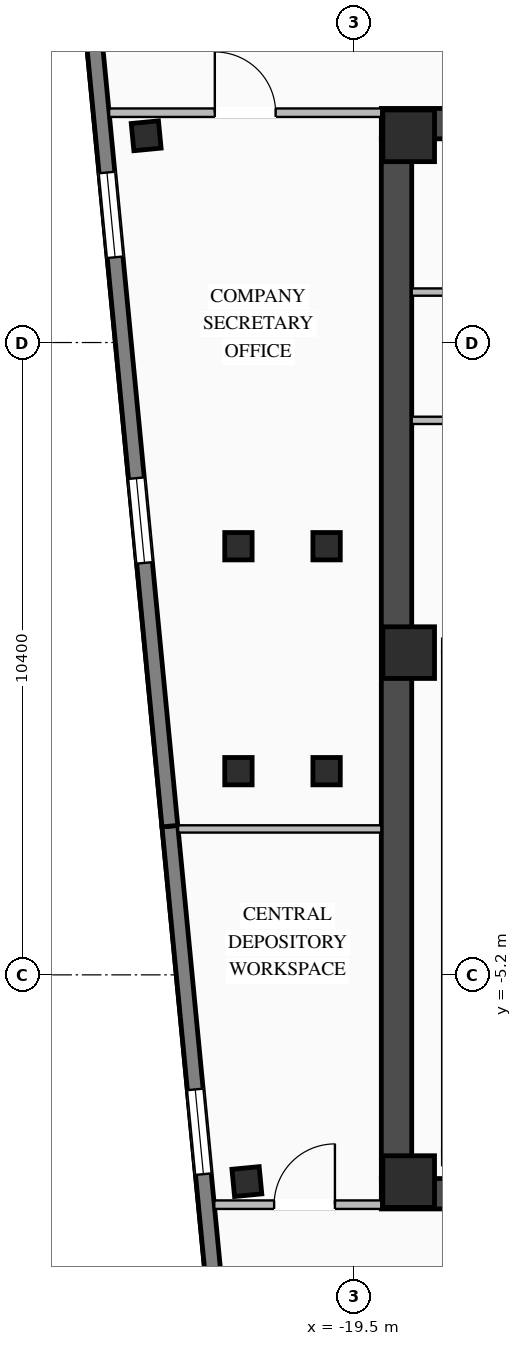
"""IFC4 building model, lengths in metres.
Left out: names, types, materials, properties, quantities, classifications, styles, units other than length and angle.
Written with IfcOpenShell. Run it as: python <this file> out.ifc"""

import sys

from ifc_helpers import new_model, si_unit, direction, frame, frame_2d, origin, origin_2d, place, context, subcontext, project, spatial, rectangle, i_section, extrude, element, fill, save


model = new_model("IFC4")
c1 = context("Model", 3, precision=1e-05, world=origin(), true_north=direction((0.0, 1.0)))
c2 = subcontext(c1, "Body", "Model", "MODEL_VIEW")
j1 = project(units=[si_unit("LENGTHUNIT", "METRE"), si_unit("PLANEANGLEUNIT", "RADIAN")], contexts=[c1])
p1 = place(None, origin())
s1 = spatial("IfcSite", under=j1, at=p1, CompositionType="ELEMENT")
p2 = place(p1, origin())
s2 = spatial("IfcBuilding", under=s1, at=p2, CompositionType="ELEMENT")
p3 = place(p2, frame((0.0, 0.0, 262.05)))
s3 = spatial("IfcBuildingStorey", under=s2, at=p3, CompositionType="ELEMENT", Elevation=262.05)
p4 = place(p3, frame((-19.05, -8.8, 0.0), z_axis=(0.0, 0.0, 1.0), x_axis=(1.0, 0.0, 0.0)))
e1 = element("IfcWall", 1, at=p4, inside=s3, PredefinedType="SHEAR", context=c2, shape_type="SweptSolid", body=[
    extrude(rectangle(XDim=10.25, YDim=0.5, at=frame_2d((5.125, 0.0))), origin(), (0.0, 0.0, 1.0), 3.27),
])
p5 = place(p3, frame((-19.05, 8.8, 0.0), z_axis=(0.0, 0.0, 1.0), x_axis=(1.0, 0.0, 0.0)))
e2 = element("IfcWall", 2, at=p5, inside=s3, PredefinedType="SHEAR", context=c2, shape_type="SweptSolid", body=[
    extrude(rectangle(XDim=10.25, YDim=0.5, at=frame_2d((5.125, 0.0))), origin(), (0.0, 0.0, 1.0), 3.27),
])
p6 = place(p5, frame((5.6, 0.0, 0.0)))
e3 = element("IfcOpeningElement", 3, at=p6, cuts=e2, PredefinedType="OPENING", context=c2, shape_type="SweptSolid", body=[
    extrude(rectangle(XDim=1.4, YDim=2.05, at=frame_2d((0.7, 1.025))), frame((0.0, 0.26, 0.0), z_axis=(0.0, -1.0, 0.0), x_axis=(1.0, 0.0, 0.0)), (0.0, 0.0, 1.0), 0.52),
])
p7 = place(p3, frame((-18.8, -8.55, 0.0), z_axis=(0.0, 0.0, 1.0), x_axis=(0.0, 1.0, 0.0)))
e4 = element("IfcWall", 4, at=p7, inside=s3, PredefinedType="SHEAR", context=c2, shape_type="SweptSolid", body=[
    extrude(rectangle(XDim=17.1, YDim=0.5, at=frame_2d((8.55, 0.0))), origin(), (0.0, 0.0, 1.0), 3.27),
])
for number, where, z_axis, x_axis in (
    (5, (-18.6, -8.6, 0.0), (0.0, 0.0, 1.0), (1.0, 0.0, 0.0)),
    (6, (-18.6, 0.1, 0.0), (0.0, 0.0, 1.0), (1.0, 0.0, 0.0)),
    (7, (-18.6, 8.6, 0.0), (0.0, 0.0, 1.0), (1.0, 0.0, 0.0)),
):
    element("IfcColumn", number, at=place(p3, frame(where, z_axis=z_axis, x_axis=x_axis)), inside=s3, PredefinedType="COLUMN", context=c2, shape_type="SweptSolid", body=[
        extrude(rectangle(XDim=0.85, YDim=0.85, at=origin_2d()), origin(), (0.0, 0.0, 1.0), 3.45),
    ])
for number, where, z_axis, x_axis in (
    (8, (-21.4, -1.85, 0.0), (0.0, 0.0, 1.0), (1.0, 0.0, 0.0)),
    (9, (-21.4, 1.85, 0.0), (0.0, 0.0, 1.0), (1.0, 0.0, 0.0)),
    (10, (-19.95, -1.85, 0.0), (0.0, 0.0, 1.0), (1.0, 0.0, 0.0)),
    (11, (-19.95, 1.85, 0.0), (0.0, 0.0, 1.0), (1.0, 0.0, 0.0)),
    (12, (-21.261, -8.6, 0.0), (0.0, 0.0, 1.0), (0.995, 0.096, 0.0)),
    (13, (-22.917, 8.6, 0.0), (0.0, 0.0, 1.0), (0.995, 0.096, 0.0)),
):
    element("IfcColumn", number, at=place(p3, frame(where, z_axis=z_axis, x_axis=x_axis)), inside=s3, PredefinedType="COLUMN", context=c2, shape_type="SweptSolid", body=[
        extrude(i_section(OverallWidth=0.45, OverallDepth=0.45, WebThickness=0.022, FlangeThickness=0.032, at=origin_2d()), origin(), (0.0, 0.0, 1.0), 3.45),
    ])
p8 = place(p3, frame((-21.075, -17.834, 0.0), z_axis=(0.0, 0.0, 1.0), x_axis=(-0.095852427869, 0.995395555582, 0.0)))
e14 = element("IfcWall", 14, at=p8, inside=s3, PredefinedType="STANDARD", context=c2, shape_type="SweptSolid", body=[
    extrude(rectangle(XDim=15.15, YDim=0.26, at=frame_2d((7.575, 0.0))), origin(), (0.0, 0.0, 1.0), 2.645),
])
p9 = place(p8, frame((4.35, 0.0, 0.535)))
e15 = element("IfcOpeningElement", 15, at=p9, cuts=e14, PredefinedType="OPENING", context=c2, shape_type="SweptSolid", body=[
    extrude(rectangle(XDim=1.4, YDim=1.95, at=frame_2d((0.7, 0.975))), frame((0.0, 0.14, 0.0), z_axis=(0.0, -1.0, 0.0), x_axis=(1.0, 0.0, 0.0)), (0.0, 0.0, 1.0), 0.28),
])
p10 = place(p8, frame((9.4, 0.0, 0.535)))
e16 = element("IfcOpeningElement", 16, at=p10, cuts=e14, PredefinedType="OPENING", context=c2, shape_type="SweptSolid", body=[
    extrude(rectangle(XDim=1.4, YDim=1.95, at=frame_2d((0.7, 0.975))), frame((0.0, 0.14, 0.0), z_axis=(0.0, -1.0, 0.0), x_axis=(1.0, 0.0, 0.0)), (0.0, 0.0, 1.0), 0.28),
])
p11 = place(p3, frame((-22.527, -2.754, 0.0), z_axis=(0.0, 0.0, 1.0), x_axis=(-0.095850890337, 0.995395703638, 0.0)))
e17 = element("IfcWall", 17, at=p11, inside=s3, PredefinedType="STANDARD", context=c2, shape_type="SweptSolid", body=[
    extrude(rectangle(XDim=15.15, YDim=0.26, at=frame_2d((7.575, 0.0))), origin(), (0.0, 0.0, 1.0), 3.25),
])
p12 = place(p11, frame((4.35, 0.0, 0.76)))
e18 = element("IfcOpeningElement", 18, at=p12, cuts=e17, PredefinedType="OPENING", context=c2, shape_type="SweptSolid", body=[
    extrude(rectangle(XDim=1.4, YDim=1.95, at=frame_2d((0.7, 0.975))), frame((0.0, 0.14, 0.0), z_axis=(0.0, -1.0, 0.0), x_axis=(1.0, 0.0, 0.0)), (0.0, 0.0, 1.0), 0.28),
])
p13 = place(p11, frame((9.4, 0.0, 0.76)))
e19 = element("IfcOpeningElement", 19, at=p13, cuts=e17, PredefinedType="OPENING", context=c2, shape_type="SweptSolid", body=[
    extrude(rectangle(XDim=1.4, YDim=1.95, at=frame_2d((0.7, 0.975))), frame((0.0, 0.14, 0.0), z_axis=(0.0, -1.0, 0.0), x_axis=(1.0, 0.0, 0.0)), (0.0, 0.0, 1.0), 0.28),
])
p14 = place(p3, frame((-18.55, 3.92, 0.0), z_axis=(0.0, 0.0, 1.0), x_axis=(1.0, 0.0, 0.0)))
e20 = element("IfcWall", 20, at=p14, inside=s3, PredefinedType="STANDARD", context=c2, shape_type="SweptSolid", body=[
    extrude(rectangle(XDim=4.65, YDim=0.12, at=frame_2d((2.325, 0.0))), origin(), (0.0, 0.0, 1.0), 3.25),
])
p15 = place(p3, frame((-18.55, 6.03, 0.0), z_axis=(0.0, 0.0, 1.0), x_axis=(1.0, 0.0, 0.0)))
e21 = element("IfcWall", 21, at=p15, inside=s3, PredefinedType="STANDARD", context=c2, shape_type="SweptSolid", body=[
    extrude(rectangle(XDim=2.4, YDim=0.12, at=frame_2d((1.2, 0.0))), origin(), (0.0, 0.0, 1.0), 3.25),
])
p16 = place(p3, frame((-23.527, 8.98, 0.0), z_axis=(0.0, 0.0, 1.0), x_axis=(1.0, 0.0, 0.0)))
e22 = element("IfcWall", 22, at=p16, inside=s3, PredefinedType="STANDARD", context=c2, shape_type="SweptSolid", body=[
    extrude(rectangle(XDim=4.477, YDim=0.14, at=frame_2d((2.238, 0.0))), origin(), (0.0, 0.0, 1.0), 3.25),
])
p17 = place(p16, frame((1.738, 0.0, 0.0)))
e23 = element("IfcOpeningElement", 23, at=p17, cuts=e22, PredefinedType="OPENING", context=c2, shape_type="SweptSolid", body=[
    extrude(rectangle(XDim=1.0, YDim=2.08, at=frame_2d((0.5, 1.04))), frame((0.0, 0.08, 0.0), z_axis=(0.0, -1.0, 0.0), x_axis=(1.0, 0.0, 0.0)), (0.0, 0.0, 1.0), 0.16),
])
p18 = place(p3, frame((-21.797, -8.98, 0.0), z_axis=(0.0, 0.0, 1.0), x_axis=(1.0, 0.0, 0.0)))
e24 = element("IfcWall", 24, at=p18, inside=s3, PredefinedType="STANDARD", context=c2, shape_type="SweptSolid", body=[
    extrude(rectangle(XDim=2.747, YDim=0.14, at=frame_2d((1.374, 0.0))), origin(), (0.0, 0.0, 1.0), 3.25),
])
p19 = place(p18, frame((0.984, 0.0, 0.0)))
e25 = element("IfcOpeningElement", 25, at=p19, cuts=e24, PredefinedType="OPENING", context=c2, shape_type="SweptSolid", body=[
    extrude(rectangle(XDim=1.0, YDim=2.08, at=frame_2d((0.5, 1.04))), frame((0.0, 0.08, 0.0), z_axis=(0.0, -1.0, 0.0), x_axis=(1.0, 0.0, 0.0)), (0.0, 0.0, 1.0), 0.16),
])
p20 = place(p3, frame((-22.392, -2.8, 0.0), z_axis=(0.0, 0.0, 1.0), x_axis=(1.0, 0.0, 0.0)))
e26 = element("IfcWall", 26, at=p20, inside=s3, PredefinedType="STANDARD", context=c2, shape_type="SweptSolid", body=[
    extrude(rectangle(XDim=3.342, YDim=0.12, at=frame_2d((1.671, 0.0))), origin(), (0.0, 0.0, 1.0), 3.25),
])
p21 = place(p10, origin())
e27 = element("IfcWindow", 27, at=p21, inside=s3, PartitioningType="SINGLE_PANEL", PredefinedType="WINDOW", context=c2, shape_type="SweptSolid", body=[
    extrude(rectangle(XDim=1.4, YDim=1.95, at=frame_2d((0.7, 0.975))), frame((0.0, 0.03, 0.0), z_axis=(0.0, -1.0, 0.0), x_axis=(1.0, 0.0, 0.0)), (0.0, 0.0, 1.0), 0.06),
])
fill(e16, e27)
p22 = place(p12, origin())
e28 = element("IfcWindow", 28, at=p22, inside=s3, PartitioningType="SINGLE_PANEL", PredefinedType="WINDOW", context=c2, shape_type="SweptSolid", body=[
    extrude(rectangle(XDim=1.4, YDim=1.95, at=frame_2d((0.7, 0.975))), frame((0.0, 0.03, 0.0), z_axis=(0.0, -1.0, 0.0), x_axis=(1.0, 0.0, 0.0)), (0.0, 0.0, 1.0), 0.06),
])
fill(e18, e28)
p23 = place(p13, origin())
e29 = element("IfcWindow", 29, at=p23, inside=s3, PartitioningType="SINGLE_PANEL", PredefinedType="WINDOW", context=c2, shape_type="SweptSolid", body=[
    extrude(rectangle(XDim=1.4, YDim=1.95, at=frame_2d((0.7, 0.975))), frame((0.0, 0.03, 0.0), z_axis=(0.0, -1.0, 0.0), x_axis=(1.0, 0.0, 0.0)), (0.0, 0.0, 1.0), 0.06),
])
fill(e19, e29)
p24 = place(p17, origin())
e30 = element("IfcDoor", 30, at=p24, inside=s3, OperationType="SINGLE_SWING_LEFT", PredefinedType="DOOR", context=c2, shape_type="SweptSolid", body=[
    extrude(rectangle(XDim=1.0, YDim=2.08, at=frame_2d((0.5, 1.04))), frame((0.0, 0.025, 0.0), z_axis=(0.0, -1.0, 0.0), x_axis=(1.0, 0.0, 0.0)), (0.0, 0.0, 1.0), 0.05),
])
fill(e23, e30)
p25 = place(p19, origin())
e31 = element("IfcDoor", 31, at=p25, inside=s3, OperationType="SINGLE_SWING_RIGHT", PredefinedType="DOOR", context=c2, shape_type="SweptSolid", body=[
    extrude(rectangle(XDim=1.0, YDim=2.08, at=frame_2d((0.5, 1.04))), frame((0.0, 0.025, 0.0), z_axis=(0.0, -1.0, 0.0), x_axis=(1.0, 0.0, 0.0)), (0.0, 0.0, 1.0), 0.05),
])
fill(e25, e31)
save(model, sys.argv[1])
